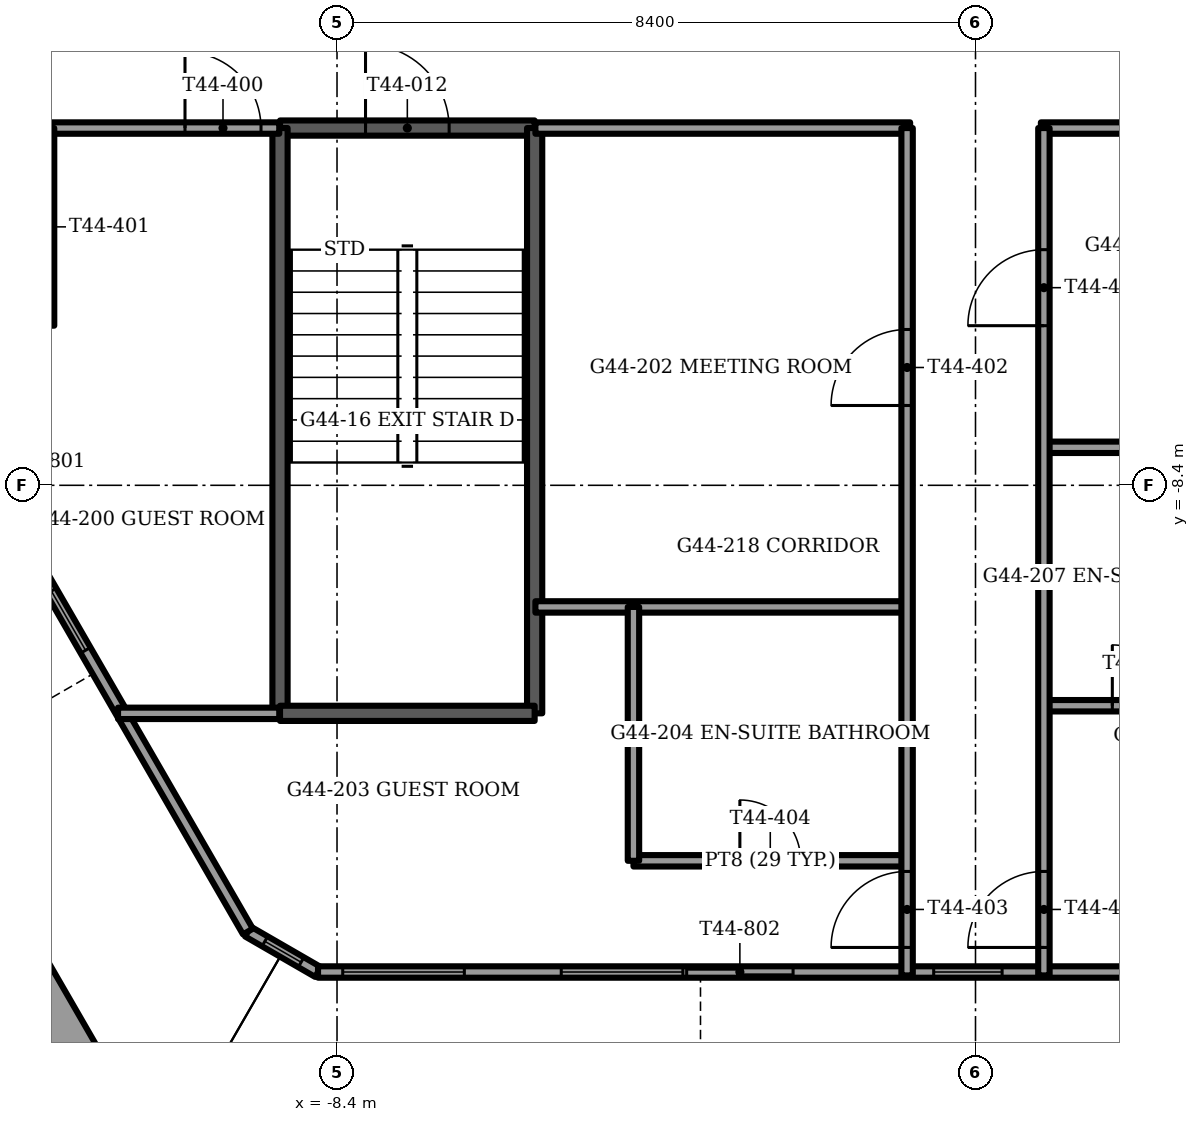
"""IFC4 building model, lengths in metres.
Left out: names, types, materials, properties, quantities, classifications, styles, units other than length and angle.
Written with IfcOpenShell. Run it as: python <this file> out.ifc"""

import sys

from ifc_helpers import new_model, si_unit, direction, frame, frame_2d, origin, place, context, subcontext, project, spatial, rectangle, extrude, element, fill, save


model = new_model("IFC4")
c1 = context("Model", 3, precision=1e-05, world=origin(), true_north=direction((0.0, 1.0)))
c2 = subcontext(c1, "Body", "Model", "MODEL_VIEW")
j1 = project(units=[si_unit("LENGTHUNIT", "METRE"), si_unit("PLANEANGLEUNIT", "RADIAN")], contexts=[c1])
p1 = place(None, origin())
s1 = spatial("IfcSite", under=j1, at=p1, CompositionType="ELEMENT")
p2 = place(p1, origin())
s2 = spatial("IfcBuilding", under=s1, at=p2, CompositionType="ELEMENT")
p3 = place(p2, frame((0.0, 0.0, 179.5)))
s3 = spatial("IfcBuildingStorey", under=s2, at=p3, CompositionType="ELEMENT", Elevation=179.5)
p4 = place(p3, frame((-13.847, -12.715, 0.0), z_axis=(0.0, 0.0, 1.0), x_axis=(0.499988348136, -0.866032130887, 0.0)))
e1 = element("IfcWall", 1, at=p4, inside=s3, PredefinedType="PARAPET", context=c2, shape_type="SweptSolid", body=[
    extrude(rectangle(XDim=5.246, YDim=0.9, at=frame_2d((2.623, 0.0))), origin(), (0.0, 0.0, 1.0), 1.1),
])
p5 = place(p3, frame((-17.145, -1.154, 0.0), z_axis=(0.0, 0.0, 1.0), x_axis=(0.500005248668, -0.866022373443, 0.0)))
e2 = element("IfcWall", 2, at=p5, inside=s3, PredefinedType="SOLIDWALL", context=c2, shape_type="SweptSolid", body=[
    extrude(rectangle(XDim=15.145, YDim=0.15, at=frame_2d((7.573, 0.0))), origin(), (0.0, 0.0, 1.0), 3.45),
])
p6 = place(p5, frame((1.573, 0.0, 0.15)))
e3 = element("IfcOpeningElement", 3, at=p6, cuts=e2, PredefinedType="OPENING", context=c2, shape_type="SweptSolid", body=[
    extrude(rectangle(XDim=0.9, YDim=2.85, at=frame_2d((0.45, 1.425))), frame((0.0, 0.075, 0.0), z_axis=(0.0, -1.0, 0.0), x_axis=(1.0, 0.0, 0.0)), (0.0, 0.0, 1.0), 0.15),
])
p7 = place(p5, frame((3.773, 0.0, 0.15)))
e4 = element("IfcOpeningElement", 4, at=p7, cuts=e2, PredefinedType="OPENING", context=c2, shape_type="SweptSolid", body=[
    extrude(rectangle(XDim=1.4, YDim=2.85, at=frame_2d((0.7, 1.425))), frame((0.0, 0.075, 0.0), z_axis=(0.0, -1.0, 0.0), x_axis=(1.0, 0.0, 0.0)), (0.0, 0.0, 1.0), 0.15),
])
p8 = place(p5, frame((6.266, 0.0, 0.15)))
e5 = element("IfcOpeningElement", 5, at=p8, cuts=e2, PredefinedType="OPENING", context=c2, shape_type="SweptSolid", body=[
    extrude(rectangle(XDim=1.6, YDim=2.85, at=frame_2d((0.8, 1.425))), frame((0.0, 0.075, 0.0), z_axis=(0.0, -1.0, 0.0), x_axis=(1.0, 0.0, 0.0)), (0.0, 0.0, 1.0), 0.15),
])
p9 = place(p5, frame((7.973, 0.0, 0.0)))
e6 = element("IfcOpeningElement", 6, at=p9, cuts=e2, PredefinedType="OPENING", context=c2, shape_type="SweptSolid", body=[
    extrude(rectangle(XDim=1.4, YDim=2.4, at=frame_2d((0.7, 1.2))), frame((0.0, 0.075, 0.0), z_axis=(0.0, -1.0, 0.0), x_axis=(1.0, 0.0, 0.0)), (0.0, 0.0, 1.0), 0.15),
])
p10 = place(p5, frame((9.973, 0.0, 0.15)))
e7 = element("IfcOpeningElement", 7, at=p10, cuts=e2, PredefinedType="OPENING", context=c2, shape_type="SweptSolid", body=[
    extrude(rectangle(XDim=0.9, YDim=2.85, at=frame_2d((0.45, 1.425))), frame((0.0, 0.075, 0.0), z_axis=(0.0, -1.0, 0.0), x_axis=(1.0, 0.0, 0.0)), (0.0, 0.0, 1.0), 0.15),
])
p11 = place(p3, frame((-8.65, -14.803, 0.0), z_axis=(0.0, 0.0, 1.0), x_axis=(1.0, 0.0, 0.0)))
e8 = element("IfcWall", 8, at=p11, inside=s3, PredefinedType="SOLIDWALL", context=c2, shape_type="SweptSolid", body=[
    extrude(rectangle(XDim=17.3, YDim=0.15, at=frame_2d((8.65, 0.0))), origin(), (0.0, 0.0, 1.0), 3.45),
])
p12 = place(p11, frame((3.2, 0.0, 0.15)))
e9 = element("IfcOpeningElement", 9, at=p12, cuts=e8, PredefinedType="OPENING", context=c2, shape_type="SweptSolid", body=[
    extrude(rectangle(XDim=1.6, YDim=2.85, at=frame_2d((0.8, 1.425))), frame((0.0, 0.075, 0.0), z_axis=(0.0, -1.0, 0.0), x_axis=(1.0, 0.0, 0.0)), (0.0, 0.0, 1.0), 0.15),
])
p13 = place(p11, frame((4.85, 0.0, 0.0)))
e10 = element("IfcOpeningElement", 10, at=p13, cuts=e8, PredefinedType="OPENING", context=c2, shape_type="SweptSolid", body=[
    extrude(rectangle(XDim=1.4, YDim=2.4, at=frame_2d((0.7, 1.2))), frame((0.0, 0.075, 0.0), z_axis=(0.0, -1.0, 0.0), x_axis=(1.0, 0.0, 0.0)), (0.0, 0.0, 1.0), 0.15),
])
p14 = place(p11, frame((8.1, 0.0, 0.15)))
e11 = element("IfcOpeningElement", 11, at=p14, cuts=e8, PredefinedType="OPENING", context=c2, shape_type="SweptSolid", body=[
    extrude(rectangle(XDim=0.9, YDim=2.85, at=frame_2d((0.45, 1.425))), frame((0.0, 0.075, 0.0), z_axis=(0.0, -1.0, 0.0), x_axis=(1.0, 0.0, 0.0)), (0.0, 0.0, 1.0), 0.15),
])
p15 = place(p11, frame((11.05, 0.0, 0.15)))
e12 = element("IfcOpeningElement", 12, at=p15, cuts=e8, PredefinedType="OPENING", context=c2, shape_type="SweptSolid", body=[
    extrude(rectangle(XDim=0.9, YDim=2.85, at=frame_2d((0.45, 1.425))), frame((0.0, 0.075, 0.0), z_axis=(0.0, -1.0, 0.0), x_axis=(1.0, 0.0, 0.0)), (0.0, 0.0, 1.0), 0.15),
])
p16 = place(p11, frame((12.15, 0.0, 0.0)))
e13 = element("IfcOpeningElement", 13, at=p16, cuts=e8, PredefinedType="OPENING", context=c2, shape_type="SweptSolid", body=[
    extrude(rectangle(XDim=1.4, YDim=2.4, at=frame_2d((0.7, 1.2))), frame((0.0, 0.075, 0.0), z_axis=(0.0, -1.0, 0.0), x_axis=(1.0, 0.0, 0.0)), (0.0, 0.0, 1.0), 0.15),
])
p17 = place(p11, frame((0.325, 0.0, 0.15)))
e14 = element("IfcOpeningElement", 14, at=p17, cuts=e8, PredefinedType="OPENING", context=c2, shape_type="SweptSolid", body=[
    extrude(rectangle(XDim=1.6, YDim=2.73, at=frame_2d((0.8, 1.365))), frame((0.0, 0.075, 0.0), z_axis=(0.0, -1.0, 0.0), x_axis=(1.0, 0.0, 0.0)), (0.0, 0.0, 1.0), 0.15),
])
p18 = place(p11, frame((15.375, 0.0, 0.15)))
e15 = element("IfcOpeningElement", 15, at=p18, cuts=e8, PredefinedType="OPENING", context=c2, shape_type="SweptSolid", body=[
    extrude(rectangle(XDim=1.6, YDim=2.73, at=frame_2d((0.8, 1.365))), frame((0.0, 0.075, 0.0), z_axis=(0.0, -1.0, 0.0), x_axis=(1.0, 0.0, 0.0)), (0.0, 0.0, 1.0), 0.15),
])
p19 = place(p3, frame((-9.572, -14.271, 0.0), z_axis=(0.0, 0.0, 1.0), x_axis=(0.865990848561, -0.500059846627, 0.0)))
e16 = element("IfcWall", 16, at=p19, inside=s3, PredefinedType="SOLIDWALL", context=c2, shape_type="SweptSolid", body=[
    extrude(rectangle(XDim=1.065, YDim=0.15, at=frame_2d((0.532, 0.0))), origin(), (0.0, 0.0, 1.0), 3.45),
])
p20 = place(p19, frame((0.258, 0.0, 0.15)))
e17 = element("IfcOpeningElement", 17, at=p20, cuts=e16, PredefinedType="OPENING", context=c2, shape_type="SweptSolid", body=[
    extrude(rectangle(XDim=0.55, YDim=2.85, at=frame_2d((0.275, 1.425))), frame((0.0, 0.075, 0.0), z_axis=(0.0, -1.0, 0.0), x_axis=(1.0, 0.0, 0.0)), (0.0, 0.0, 1.0), 0.15),
])
p21 = place(p3, frame((-9.15, -3.7, -0.3), z_axis=(0.0, 0.0, 1.0), x_axis=(1.0, 0.0, 0.0)))
e18 = element("IfcWall", 18, at=p21, inside=s3, PredefinedType="SOLIDWALL", context=c2, shape_type="SweptSolid", body=[
    extrude(rectangle(XDim=3.35, YDim=0.2, at=frame_2d((1.675, 0.0))), origin(), (0.0, 0.0, 1.0), 3.75),
])
p22 = place(p21, frame((1.125, 0.0, 0.0)))
e19 = element("IfcOpeningElement", 19, at=p22, cuts=e18, PredefinedType="OPENING", context=c2, shape_type="SweptSolid", body=[
    extrude(rectangle(XDim=1.1, YDim=2.1, at=frame_2d((0.55, 1.05))), frame((0.0, 0.1, 0.0), z_axis=(0.0, -1.0, 0.0), x_axis=(1.0, 0.0, 0.0)), (0.0, 0.0, 1.0), 0.2),
])
for number, where, z_axis, x_axis in (
    (20, (-9.15, -3.7, -0.3), (0.0, 0.0, 1.0), (0.0, -1.0, 0.0)),
    (21, (-5.8, -3.7, -0.3), (0.0, 0.0, 1.0), (0.0, -1.0, 0.0)),
):
    element("IfcWall", number, at=place(p3, frame(where, z_axis=z_axis, x_axis=x_axis)), inside=s3, PredefinedType="SOLIDWALL", context=c2, shape_type="SweptSolid", body=[
        extrude(rectangle(XDim=7.7, YDim=0.2, at=frame_2d((3.85, 0.0))), origin(), (0.0, 0.0, 1.0), 3.75),
    ])
p23 = place(p3, frame((-9.15, -11.4, -0.3), z_axis=(0.0, 0.0, 1.0), x_axis=(1.0, 0.0, 0.0)))
e22 = element("IfcWall", 22, at=p23, inside=s3, PredefinedType="SOLIDWALL", context=c2, shape_type="SweptSolid", body=[
    extrude(rectangle(XDim=3.35, YDim=0.2, at=frame_2d((1.675, 0.0))), origin(), (0.0, 0.0, 1.0), 3.75),
])
p24 = place(p3, frame((-4.5, -13.34, 0.0), z_axis=(0.0, 0.0, 1.0), x_axis=(1.0, 0.0, 0.0)))
e23 = element("IfcWall", 23, at=p24, inside=s3, PredefinedType="PARTITIONING", context=c2, shape_type="SweptSolid", body=[
    extrude(rectangle(XDim=3.6, YDim=0.15, at=frame_2d((1.8, 0.0))), origin(), (0.0, 0.0, 1.0), 3.45),
])
p25 = place(p24, frame((1.4, 0.0, 0.0)))
e24 = element("IfcOpeningElement", 24, at=p25, cuts=e23, PredefinedType="OPENING", context=c2, shape_type="SweptSolid", body=[
    extrude(rectangle(XDim=0.8, YDim=2.1, at=frame_2d((0.4, 1.05))), frame((0.0, 0.075, 0.0), z_axis=(0.0, -1.0, 0.0), x_axis=(1.0, 0.0, 0.0)), (0.0, 0.0, 1.0), 0.15),
])
p26 = place(p3, frame((-11.281, -11.4, 0.0), z_axis=(0.0, 0.0, 1.0), x_axis=(1.0, 0.0, 0.0)))
e25 = element("IfcWall", 25, at=p26, inside=s3, PredefinedType="PARTITIONING", context=c2, shape_type="SweptSolid", body=[
    extrude(rectangle(XDim=2.121, YDim=0.15, at=frame_2d((1.061, 0.0))), origin(), (0.0, 0.0, 1.0), 3.45),
])
p27 = place(p3, frame((0.9, -11.3, 0.0), z_axis=(0.0, 0.0, 1.0), x_axis=(1.0, 0.0, 0.0)))
e26 = element("IfcWall", 26, at=p27, inside=s3, PredefinedType="PARTITIONING", context=c2, shape_type="SweptSolid", body=[
    extrude(rectangle(XDim=2.6, YDim=0.15, at=frame_2d((1.3, 0.0))), origin(), (0.0, 0.0, 1.0), 3.45),
])
p28 = place(p27, frame((0.9, 0.0, 0.0)))
e27 = element("IfcOpeningElement", 27, at=p28, cuts=e26, PredefinedType="OPENING", context=c2, shape_type="SweptSolid", body=[
    extrude(rectangle(XDim=0.8, YDim=2.1, at=frame_2d((0.4, 1.05))), frame((0.0, 0.075, 0.0), z_axis=(0.0, -1.0, 0.0), x_axis=(1.0, 0.0, 0.0)), (0.0, 0.0, 1.0), 0.15),
])
for number, where, z_axis, x_axis in (
    (28, (-5.79, -10.0, 0.0), (0.0, 0.0, 1.0), (1.0, 0.0, 0.0)),
    (29, (0.9, -7.9, 0.0), (0.0, 0.0, 1.0), (1.0, 0.0, 0.0)),
):
    element("IfcWall", number, at=place(p3, frame(where, z_axis=z_axis, x_axis=x_axis)), inside=s3, PredefinedType="PARTITIONING", context=c2, shape_type="SweptSolid", body=[
        extrude(rectangle(XDim=4.89, YDim=0.15, at=frame_2d((2.445, 0.0))), origin(), (0.0, 0.0, 1.0), 3.45),
    ])
p29 = place(p3, frame((-15.727, -3.7, 0.0), z_axis=(0.0, 0.0, 1.0), x_axis=(1.0, 0.0, 0.0)))
e30 = element("IfcWall", 30, at=p29, inside=s3, PredefinedType="PARTITIONING", context=c2, shape_type="SweptSolid", body=[
    extrude(rectangle(XDim=6.567, YDim=0.15, at=frame_2d((3.284, 0.0))), origin(), (0.0, 0.0, 1.0), 3.45),
])
p30 = place(p29, frame((5.327, 0.0, 0.0)))
e31 = element("IfcOpeningElement", 31, at=p30, cuts=e30, PredefinedType="OPENING", context=c2, shape_type="SweptSolid", body=[
    extrude(rectangle(XDim=1.0, YDim=2.1, at=frame_2d((0.5, 1.05))), frame((0.0, 0.075, 0.0), z_axis=(0.0, -1.0, 0.0), x_axis=(1.0, 0.0, 0.0)), (0.0, 0.0, 1.0), 0.15),
])
for number, where, z_axis, x_axis in (
    (32, (-5.79, -3.7, 0.0), (0.0, 0.0, 1.0), (1.0, 0.0, 0.0)),
    (33, (0.86, -3.7, 0.0), (0.0, 0.0, 1.0), (1.0, 0.0, 0.0)),
):
    element("IfcWall", number, at=place(p3, frame(where, z_axis=z_axis, x_axis=x_axis)), inside=s3, PredefinedType="PARTITIONING", context=c2, shape_type="SweptSolid", body=[
        extrude(rectangle(XDim=4.93, YDim=0.15, at=frame_2d((2.465, 0.0))), origin(), (0.0, 0.0, 1.0), 3.45),
    ])
p31 = place(p3, frame((0.9, -14.848, 0.0), z_axis=(0.0, 0.0, 1.0), x_axis=(0.0, 1.0, 0.0)))
e34 = element("IfcWall", 34, at=p31, inside=s3, PredefinedType="PARTITIONING", context=c2, shape_type="SweptSolid", body=[
    extrude(rectangle(XDim=11.148, YDim=0.15, at=frame_2d((5.574, 0.0))), origin(), (0.0, 0.0, 1.0), 3.45),
])
p32 = place(p31, frame((8.548, 0.0, 0.0)))
e35 = element("IfcOpeningElement", 35, at=p32, cuts=e34, PredefinedType="OPENING", context=c2, shape_type="SweptSolid", body=[
    extrude(rectangle(XDim=1.0, YDim=2.1, at=frame_2d((0.5, 1.05))), frame((0.0, 0.075, 0.0), z_axis=(0.0, -1.0, 0.0), x_axis=(1.0, 0.0, 0.0)), (0.0, 0.0, 1.0), 0.15),
])
p33 = place(p31, frame((0.368, 0.0, 0.0)))
e36 = element("IfcOpeningElement", 36, at=p33, cuts=e34, PredefinedType="OPENING", context=c2, shape_type="SweptSolid", body=[
    extrude(rectangle(XDim=1.0, YDim=2.1, at=frame_2d((0.5, 1.05))), frame((0.0, 0.075, 0.0), z_axis=(0.0, -1.0, 0.0), x_axis=(1.0, 0.0, 0.0)), (0.0, 0.0, 1.0), 0.15),
])
p34 = place(p3, frame((-0.9, -14.848, 0.0), z_axis=(0.0, 0.0, 1.0), x_axis=(0.0, 1.0, 0.0)))
e37 = element("IfcWall", 37, at=p34, inside=s3, PredefinedType="PARTITIONING", context=c2, shape_type="SweptSolid", body=[
    extrude(rectangle(XDim=11.148, YDim=0.15, at=frame_2d((5.574, 0.0))), origin(), (0.0, 0.0, 1.0), 3.45),
])
p35 = place(p34, frame((7.498, 0.0, 0.0)))
e38 = element("IfcOpeningElement", 38, at=p35, cuts=e37, PredefinedType="OPENING", context=c2, shape_type="SweptSolid", body=[
    extrude(rectangle(XDim=1.0, YDim=2.1, at=frame_2d((0.5, 1.05))), frame((0.0, 0.075, 0.0), z_axis=(0.0, -1.0, 0.0), x_axis=(1.0, 0.0, 0.0)), (0.0, 0.0, 1.0), 0.15),
])
p36 = place(p34, frame((0.368, 0.0, 0.0)))
e39 = element("IfcOpeningElement", 39, at=p36, cuts=e37, PredefinedType="OPENING", context=c2, shape_type="SweptSolid", body=[
    extrude(rectangle(XDim=1.0, YDim=2.1, at=frame_2d((0.5, 1.05))), frame((0.0, 0.075, 0.0), z_axis=(0.0, -1.0, 0.0), x_axis=(1.0, 0.0, 0.0)), (0.0, 0.0, 1.0), 0.15),
])
p37 = place(p3, frame((-4.5, -13.34, 0.0), z_axis=(0.0, 0.0, 1.0), x_axis=(0.0, 1.0, 0.0)))
e40 = element("IfcWall", 40, at=p37, inside=s3, PredefinedType="PARTITIONING", context=c2, shape_type="SweptSolid", body=[
    extrude(rectangle(XDim=3.34, YDim=0.15, at=frame_2d((1.67, 0.0))), origin(), (0.0, 0.0, 1.0), 3.45),
])
p38 = place(p3, frame((-12.195, -6.3, 0.0), z_axis=(0.0, 0.0, 1.0), x_axis=(0.0, 1.0, 0.0)))
e41 = element("IfcWall", 41, at=p38, inside=s3, PredefinedType="PARTITIONING", context=c2, shape_type="SweptSolid", body=[
    extrude(rectangle(XDim=2.6, YDim=0.15, at=frame_2d((1.3, 0.0))), origin(), (0.0, 0.0, 1.0), 3.45),
])
p39 = place(p38, frame((0.9, 0.0, 0.0)))
e42 = element("IfcOpeningElement", 42, at=p39, cuts=e41, PredefinedType="OPENING", context=c2, shape_type="SweptSolid", body=[
    extrude(rectangle(XDim=0.8, YDim=2.1, at=frame_2d((0.4, 1.05))), frame((0.0, 0.075, 0.0), z_axis=(0.0, -1.0, 0.0), x_axis=(1.0, 0.0, 0.0)), (0.0, 0.0, 1.0), 0.15),
])
p40 = place(p10, origin())
e43 = element("IfcWindow", 43, at=p40, inside=s3, PartitioningType="SINGLE_PANEL", PredefinedType="WINDOW", context=c2, shape_type="SweptSolid", body=[
    extrude(rectangle(XDim=0.9, YDim=2.85, at=frame_2d((0.45, 1.425))), frame((0.0, 0.03, 0.0), z_axis=(0.0, -1.0, 0.0), x_axis=(1.0, 0.0, 0.0)), (0.0, 0.0, 1.0), 0.06),
])
fill(e7, e43)
p41 = place(p12, origin())
e44 = element("IfcWindow", 44, at=p41, inside=s3, PartitioningType="SINGLE_PANEL", PredefinedType="WINDOW", context=c2, shape_type="SweptSolid", body=[
    extrude(rectangle(XDim=1.6, YDim=2.85, at=frame_2d((0.8, 1.425))), frame((0.0, 0.03, 0.0), z_axis=(0.0, -1.0, 0.0), x_axis=(1.0, 0.0, 0.0)), (0.0, 0.0, 1.0), 0.06),
])
fill(e9, e44)
p42 = place(p13, origin())
e45 = element("IfcDoor", 45, at=p42, inside=s3, OperationType="SLIDING_TO_LEFT", PredefinedType="DOOR", context=c2, shape_type="SweptSolid", body=[
    extrude(rectangle(XDim=1.4, YDim=2.4, at=frame_2d((0.7, 1.2))), frame((0.0, 0.025, 0.0), z_axis=(0.0, -1.0, 0.0), x_axis=(1.0, 0.0, 0.0)), (0.0, 0.0, 1.0), 0.05),
])
fill(e10, e45)
p43 = place(p14, origin())
e46 = element("IfcWindow", 46, at=p43, inside=s3, PartitioningType="SINGLE_PANEL", PredefinedType="WINDOW", context=c2, shape_type="SweptSolid", body=[
    extrude(rectangle(XDim=0.9, YDim=2.85, at=frame_2d((0.45, 1.425))), frame((0.0, 0.03, 0.0), z_axis=(0.0, -1.0, 0.0), x_axis=(1.0, 0.0, 0.0)), (0.0, 0.0, 1.0), 0.06),
])
fill(e11, e46)
p44 = place(p17, origin())
e47 = element("IfcWindow", 47, at=p44, inside=s3, PartitioningType="SINGLE_PANEL", PredefinedType="WINDOW", context=c2, shape_type="SweptSolid", body=[
    extrude(rectangle(XDim=1.6, YDim=2.73, at=frame_2d((0.8, 1.365))), frame((0.0, 0.03, 0.0), z_axis=(0.0, -1.0, 0.0), x_axis=(1.0, 0.0, 0.0)), (0.0, 0.0, 1.0), 0.06),
])
fill(e14, e47)
p45 = place(p20, origin())
e48 = element("IfcWindow", 48, at=p45, inside=s3, PartitioningType="SINGLE_PANEL", PredefinedType="WINDOW", context=c2, shape_type="SweptSolid", body=[
    extrude(rectangle(XDim=0.55, YDim=2.85, at=frame_2d((0.275, 1.425))), frame((0.0, 0.03, 0.0), z_axis=(0.0, -1.0, 0.0), x_axis=(1.0, 0.0, 0.0)), (0.0, 0.0, 1.0), 0.06),
])
fill(e17, e48)
p46 = place(p22, origin())
e49 = element("IfcDoor", 49, at=p46, inside=s3, OperationType="SINGLE_SWING_LEFT", PredefinedType="DOOR", context=c2, shape_type="SweptSolid", body=[
    extrude(rectangle(XDim=1.1, YDim=2.1, at=frame_2d((0.55, 1.05))), frame((0.0, 0.025, 0.0), z_axis=(0.0, -1.0, 0.0), x_axis=(1.0, 0.0, 0.0)), (0.0, 0.0, 1.0), 0.05),
])
fill(e19, e49)
p47 = place(p30, origin())
e50 = element("IfcDoor", 50, at=p47, inside=s3, OperationType="SINGLE_SWING_RIGHT", PredefinedType="DOOR", context=c2, shape_type="SweptSolid", body=[
    extrude(rectangle(XDim=1.0, YDim=2.1, at=frame_2d((0.5, 1.05))), frame((0.0, 0.025, 0.0), z_axis=(0.0, -1.0, 0.0), x_axis=(1.0, 0.0, 0.0)), (0.0, 0.0, 1.0), 0.05),
])
fill(e31, e50)
p48 = place(p35, origin())
e51 = element("IfcDoor", 51, at=p48, inside=s3, OperationType="SINGLE_SWING_LEFT", PredefinedType="DOOR", context=c2, shape_type="SweptSolid", body=[
    extrude(rectangle(XDim=1.0, YDim=2.1, at=frame_2d((0.5, 1.05))), frame((0.0, 0.025, 0.0), z_axis=(0.0, -1.0, 0.0), x_axis=(1.0, 0.0, 0.0)), (0.0, 0.0, 1.0), 0.05),
])
fill(e38, e51)
p49 = place(p36, origin())
e52 = element("IfcDoor", 52, at=p49, inside=s3, OperationType="SINGLE_SWING_LEFT", PredefinedType="DOOR", context=c2, shape_type="SweptSolid", body=[
    extrude(rectangle(XDim=1.0, YDim=2.1, at=frame_2d((0.5, 1.05))), frame((0.0, 0.025, 0.0), z_axis=(0.0, -1.0, 0.0), x_axis=(1.0, 0.0, 0.0)), (0.0, 0.0, 1.0), 0.05),
])
fill(e39, e52)
p50 = place(p25, origin())
e53 = element("IfcDoor", 53, at=p50, inside=s3, OperationType="SINGLE_SWING_RIGHT", PredefinedType="DOOR", context=c2, shape_type="SweptSolid", body=[
    extrude(rectangle(XDim=0.8, YDim=2.1, at=frame_2d((0.4, 1.05))), frame((0.0, 0.025, 0.0), z_axis=(0.0, -1.0, 0.0), x_axis=(1.0, 0.0, 0.0)), (0.0, 0.0, 1.0), 0.05),
])
fill(e24, e53)
p51 = place(p32, origin())
e54 = element("IfcDoor", 54, at=p51, inside=s3, OperationType="SINGLE_SWING_RIGHT", PredefinedType="DOOR", context=c2, shape_type="SweptSolid", body=[
    extrude(rectangle(XDim=1.0, YDim=2.1, at=frame_2d((0.5, 1.05))), frame((0.0, 0.025, 0.0), z_axis=(0.0, -1.0, 0.0), x_axis=(1.0, 0.0, 0.0)), (0.0, 0.0, 1.0), 0.05),
])
fill(e35, e54)
p52 = place(p33, origin())
e55 = element("IfcDoor", 55, at=p52, inside=s3, OperationType="SINGLE_SWING_LEFT", PredefinedType="DOOR", context=c2, shape_type="SweptSolid", body=[
    extrude(rectangle(XDim=1.0, YDim=2.1, at=frame_2d((0.5, 1.05))), frame((0.0, 0.025, 0.0), z_axis=(0.0, -1.0, 0.0), x_axis=(1.0, 0.0, 0.0)), (0.0, 0.0, 1.0), 0.05),
])
fill(e36, e55)
p53 = place(p28, origin())
e56 = element("IfcDoor", 56, at=p53, inside=s3, OperationType="SINGLE_SWING_LEFT", PredefinedType="DOOR", context=c2, shape_type="SweptSolid", body=[
    extrude(rectangle(XDim=0.8, YDim=2.1, at=frame_2d((0.4, 1.05))), frame((0.0, 0.025, 0.0), z_axis=(0.0, -1.0, 0.0), x_axis=(1.0, 0.0, 0.0)), (0.0, 0.0, 1.0), 0.05),
])
fill(e27, e56)
save(model, sys.argv[1])
